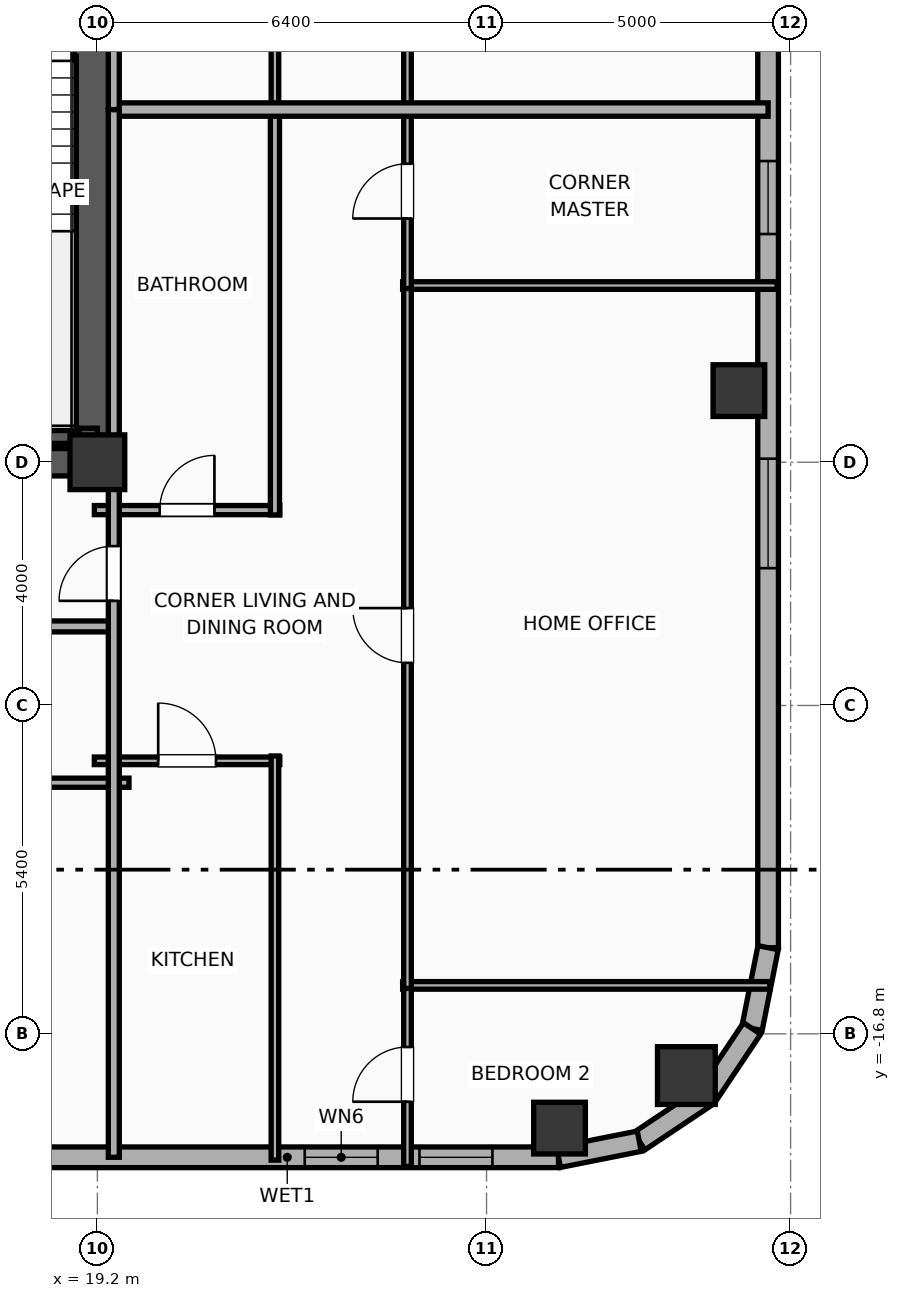
"""IFC4 building model, lengths in metres.
Left out: names, types, materials, properties, quantities, classifications, styles, units other than length and angle.
Written with IfcOpenShell. Run it as: python <this file> out.ifc"""

import sys

from ifc_helpers import new_model, si_unit, direction, frame, frame_2d, origin, origin_2d, place, context, subcontext, project, spatial, rectangle, hollow_rectangle, hollow_circle, extrude, element, fill, save


model = new_model("IFC4")
c1 = context("Model", 3, precision=1e-05, world=origin(), true_north=direction((0.0, 1.0)))
c2 = subcontext(c1, "Body", "Model", "MODEL_VIEW")
j1 = project(units=[si_unit("LENGTHUNIT", "METRE"), si_unit("PLANEANGLEUNIT", "RADIAN")], contexts=[c1])
p1 = place(None, origin())
s1 = spatial("IfcSite", under=j1, at=p1, CompositionType="ELEMENT")
p2 = place(p1, origin())
s2 = spatial("IfcBuilding", under=s1, at=p2, CompositionType="ELEMENT")
p3 = place(p2, frame((0.0, 0.0, 200.2)))
s3 = spatial("IfcBuildingStorey", under=s2, at=p3, CompositionType="ELEMENT", Elevation=200.2)
p4 = place(p3, frame((19.2, -7.4, 0.0), z_axis=(0.0, 0.0, 1.0), x_axis=(1.0, 0.0, 0.0)))
e1 = element("IfcColumn", 1, at=p4, inside=s3, PredefinedType="COLUMN", context=c2, shape_type="SweptSolid", body=[
    extrude(rectangle(XDim=0.9, YDim=0.9, at=origin_2d()), origin(), (0.0, 0.0, 1.0), 3.9),
])
p5 = place(p3, frame((12.175, -7.4, 0.0), z_axis=(0.0, 0.0, 1.0), x_axis=(1.0, 0.0, 0.0)))
e2 = element("IfcWall", 2, at=p5, inside=s3, PredefinedType="SHEAR", context=c2, shape_type="SweptSolid", body=[
    extrude(rectangle(XDim=7.25, YDim=0.45, at=frame_2d((3.625, 0.0))), origin(), (0.0, 0.0, 1.0), 3.65),
])
p6 = place(p3, frame((19.145, -7.4, 0.0), z_axis=(0.0, 0.0, 1.0), x_axis=(0.0, 1.0, 0.0)))
e3 = element("IfcWall", 3, at=p6, inside=s3, PredefinedType="SHEAR", context=c2, shape_type="SweptSolid", body=[
    extrude(rectangle(XDim=14.8, YDim=0.65, at=frame_2d((7.4, 0.0))), origin(), (0.0, 0.0, 1.0), 3.65),
])
p7 = place(p3, frame((15.74, -6.965, 0.0), z_axis=(0.0, 0.0, 1.0), x_axis=(1.0, 0.0, 0.0)))
e4 = element("IfcWall", 4, at=p7, inside=s3, PredefinedType="SOLIDWALL", context=c2, shape_type="SweptSolid", body=[
    extrude(rectangle(XDim=3.46, YDim=0.25, at=frame_2d((1.73, 0.0))), origin(), (0.0, 0.0, 1.0), 3.65),
])
p8 = place(p3, frame((26.8, -18.35, 0.0), z_axis=(0.0, 0.0, 1.0), x_axis=(1.0, 0.0, 0.0)))
e5 = element("IfcColumn", 5, at=p8, inside=s3, PredefinedType="COLUMN", context=c2, shape_type="SweptSolid", body=[
    extrude(hollow_rectangle(XDim=0.85, YDim=0.85, WallThickness=0.028, at=origin_2d()), origin(), (0.0, 0.0, 1.0), 3.9),
])
p9 = place(p3, frame((28.886, -17.486, 0.0), z_axis=(0.0, 0.0, 1.0), x_axis=(1.0, 0.0, 0.0)))
e6 = element("IfcColumn", 6, at=p9, inside=s3, PredefinedType="COLUMN", context=c2, shape_type="SweptSolid", body=[
    extrude(hollow_circle(Radius=0.475, WallThickness=0.032, at=origin_2d()), origin(), (0.0, 0.0, 1.0), 3.9),
])
p10 = place(p3, frame((29.75, -6.222, 0.0), z_axis=(0.0, 0.0, 1.0), x_axis=(1.0, 0.0, 0.0)))
e7 = element("IfcColumn", 7, at=p10, inside=s3, PredefinedType="COLUMN", context=c2, shape_type="SweptSolid", body=[
    extrude(hollow_rectangle(XDim=0.85, YDim=0.85, WallThickness=0.028, at=origin_2d()), origin(), (0.0, 0.0, 1.0), 3.9),
])
p11 = place(p3, frame((26.783, -18.83, 0.0), z_axis=(0.0, 0.0, 1.0), x_axis=(-1.0, 0.0, 0.0)))
e8 = element("IfcWall", 8, at=p11, inside=s3, PredefinedType="ELEMENTEDWALL", context=c2, shape_type="SweptSolid", body=[
    extrude(rectangle(XDim=8.922, YDim=0.34, at=frame_2d((4.461, 0.0))), origin(), (0.0, 0.0, 1.0), 2.54),
])
p12 = place(p11, frame((2.973, 0.0, 0.75)))
e9 = element("IfcOpeningElement", 9, at=p12, cuts=e8, PredefinedType="OPENING", context=c2, shape_type="SweptSolid", body=[
    extrude(rectangle(XDim=1.2, YDim=1.63, at=frame_2d((0.6, 0.815))), frame((0.0, 0.18, 0.0), z_axis=(0.0, -1.0, 0.0), x_axis=(1.0, 0.0, 0.0)), (0.0, 0.0, 1.0), 0.36),
])
p13 = place(p11, frame((1.087, 0.0, 0.75)))
e10 = element("IfcOpeningElement", 10, at=p13, cuts=e8, PredefinedType="OPENING", context=c2, shape_type="SweptSolid", body=[
    extrude(rectangle(XDim=1.2, YDim=1.63, at=frame_2d((0.6, 0.815))), frame((0.0, 0.18, 0.0), z_axis=(0.0, -1.0, 0.0), x_axis=(1.0, 0.0, 0.0)), (0.0, 0.0, 1.0), 0.36),
])
p14 = place(p3, frame((30.23, 16.583, 0.0), z_axis=(0.0, 0.0, 1.0), x_axis=(0.0, -1.0, 0.0)))
e11 = element("IfcWall", 11, at=p14, inside=s3, PredefinedType="ELEMENTEDWALL", context=c2, shape_type="SweptSolid", body=[
    extrude(rectangle(XDim=31.967, YDim=0.34, at=frame_2d((15.983, 0.0))), origin(), (0.0, 0.0, 1.0), 2.54),
])
p15 = place(p14, frame((6.242, 0.0, 0.75)))
e12 = element("IfcOpeningElement", 12, at=p15, cuts=e11, PredefinedType="OPENING", context=c2, shape_type="SweptSolid", body=[
    extrude(rectangle(XDim=1.8, YDim=1.63, at=frame_2d((0.9, 0.815))), frame((0.0, 0.18, 0.0), z_axis=(0.0, -1.0, 0.0), x_axis=(1.0, 0.0, 0.0)), (0.0, 0.0, 1.0), 0.36),
])
p16 = place(p14, frame((23.925, 0.0, 0.75)))
e13 = element("IfcOpeningElement", 13, at=p16, cuts=e11, PredefinedType="OPENING", context=c2, shape_type="SweptSolid", body=[
    extrude(rectangle(XDim=1.8, YDim=1.63, at=frame_2d((0.9, 0.815))), frame((0.0, 0.18, 0.0), z_axis=(0.0, -1.0, 0.0), x_axis=(1.0, 0.0, 0.0)), (0.0, 0.0, 1.0), 0.36),
])
p17 = place(p14, frame((19.03, 0.0, 0.75)))
e14 = element("IfcOpeningElement", 14, at=p17, cuts=e11, PredefinedType="OPENING", context=c2, shape_type="SweptSolid", body=[
    extrude(rectangle(XDim=1.2, YDim=1.63, at=frame_2d((0.6, 0.815))), frame((0.0, 0.18, 0.0), z_axis=(0.0, -1.0, 0.0), x_axis=(1.0, 0.0, 0.0)), (0.0, 0.0, 1.0), 0.36),
])
p18 = place(p14, frame((15.773, 0.0, 0.75)))
e15 = element("IfcOpeningElement", 15, at=p18, cuts=e11, PredefinedType="OPENING", context=c2, shape_type="SweptSolid", body=[
    extrude(rectangle(XDim=1.2, YDim=1.63, at=frame_2d((0.6, 0.815))), frame((0.0, 0.18, 0.0), z_axis=(0.0, -1.0, 0.0), x_axis=(1.0, 0.0, 0.0)), (0.0, 0.0, 1.0), 0.36),
])
p19 = place(p3, frame((30.23, -15.383, 0.0), z_axis=(0.0, 0.0, 1.0), x_axis=(-0.195110379894, -0.98078129043, 0.0)))
e16 = element("IfcWall", 16, at=p19, inside=s3, PredefinedType="ELEMENTEDWALL", context=c2, shape_type="SweptSolid", body=[
    extrude(rectangle(XDim=1.354, YDim=0.34, at=frame_2d((0.677, 0.0))), origin(), (0.0, 0.0, 1.0), 3.65),
])
p20 = place(p3, frame((29.966, -16.711, 0.0), z_axis=(0.0, 0.0, 1.0), x_axis=(-0.555584683399, -0.831459956686, 0.0)))
e17 = element("IfcWall", 17, at=p20, inside=s3, PredefinedType="ELEMENTEDWALL", context=c2, shape_type="SweptSolid", body=[
    extrude(rectangle(XDim=1.337, YDim=0.34, at=frame_2d((0.668, 0.0))), origin(), (0.0, 0.0, 1.0), 3.65),
])
p21 = place(p3, frame((29.223, -17.823, 0.0), z_axis=(0.0, 0.0, 1.0), x_axis=(-0.831403586725, -0.555669034571, 0.0)))
e18 = element("IfcWall", 18, at=p21, inside=s3, PredefinedType="ELEMENTEDWALL", context=c2, shape_type="SweptSolid", body=[
    extrude(rectangle(XDim=1.337, YDim=0.34, at=frame_2d((0.668, 0.0))), origin(), (0.0, 0.0, 1.0), 2.54),
])
p22 = place(p3, frame((28.111, -18.566, 0.0), z_axis=(0.0, 0.0, 1.0), x_axis=(-0.980788153188, -0.195075878998, 0.0)))
e19 = element("IfcWall", 19, at=p22, inside=s3, PredefinedType="ELEMENTEDWALL", context=c2, shape_type="SweptSolid", body=[
    extrude(rectangle(XDim=1.354, YDim=0.34, at=frame_2d((0.677, 0.0))), origin(), (0.0, 0.0, 1.0), 2.54),
])
p23 = place(p3, frame((17.436, -12.67, 0.0), z_axis=(0.0, 0.0, 1.0), x_axis=(1.0, 0.0, 0.0)))
e20 = element("IfcWall", 20, at=p23, inside=s3, PredefinedType="PLUMBINGWALL", context=c2, shape_type="SweptSolid", body=[
    extrude(rectangle(XDim=2.284, YDim=0.15, at=frame_2d((1.142, 0.0))), origin(), (0.0, 0.0, 1.0), 3.65),
])
p24 = place(p3, frame((8.08, -10.1, 0.0), z_axis=(0.0, 0.0, 1.0), x_axis=(1.0, 0.0, 0.0)))
e21 = element("IfcWall", 21, at=p24, inside=s3, PredefinedType="PARTITIONING", context=c2, shape_type="SweptSolid", body=[
    extrude(rectangle(XDim=11.42, YDim=0.18, at=frame_2d((5.71, 0.0))), origin(), (0.0, 0.0, 1.0), 3.65),
])
p25 = place(p24, frame((1.175, 0.0, 0.0)))
e22 = element("IfcOpeningElement", 22, at=p25, cuts=e21, PredefinedType="OPENING", context=c2, shape_type="SweptSolid", body=[
    extrude(rectangle(XDim=1.15, YDim=2.05, at=frame_2d((0.575, 1.025))), frame((0.0, 0.1, 0.0), z_axis=(0.0, -1.0, 0.0), x_axis=(1.0, 0.0, 0.0)), (0.0, 0.0, 1.0), 0.2),
])
p26 = place(p24, frame((8.243, 0.0, 0.0)))
e23 = element("IfcOpeningElement", 23, at=p26, cuts=e21, PredefinedType="OPENING", context=c2, shape_type="SweptSolid", body=[
    extrude(rectangle(XDim=0.9, YDim=2.05, at=frame_2d((0.45, 1.025))), frame((0.0, 0.1, 0.0), z_axis=(0.0, -1.0, 0.0), x_axis=(1.0, 0.0, 0.0)), (0.0, 0.0, 1.0), 0.2),
])
p27 = place(p3, frame((24.22, -16.003, 0.0), z_axis=(0.0, 0.0, 1.0), x_axis=(1.0, 0.0, 0.0)))
e24 = element("IfcWall", 24, at=p27, inside=s3, PredefinedType="PARTITIONING", context=c2, shape_type="SweptSolid", body=[
    extrude(rectangle(XDim=6.04, YDim=0.125, at=frame_2d((3.02, 0.0))), origin(), (0.0, 0.0, 1.0), 3.65),
])
p28 = place(p3, frame((24.22, -4.494, 0.0), z_axis=(0.0, 0.0, 1.0), x_axis=(1.0, 0.0, 0.0)))
e25 = element("IfcWall", 25, at=p28, inside=s3, PredefinedType="PARTITIONING", context=c2, shape_type="SweptSolid", body=[
    extrude(rectangle(XDim=6.16, YDim=0.125, at=frame_2d((3.08, 0.0))), origin(), (0.0, 0.0, 1.0), 3.65),
])
p29 = place(p3, frame((24.3, -18.98, 0.0), z_axis=(0.0, 0.0, 1.0), x_axis=(0.0, 1.0, 0.0)))
e26 = element("IfcWall", 26, at=p29, inside=s3, PredefinedType="PARTITIONING", context=c2, shape_type="SweptSolid", body=[
    extrude(rectangle(XDim=3.027, YDim=0.125, at=frame_2d((1.514, 0.0))), origin(), (0.0, 0.0, 1.0), 3.65),
])
p30 = place(p29, frame((1.063, 0.0, 0.0)))
e27 = element("IfcOpeningElement", 27, at=p30, cuts=e26, PredefinedType="OPENING", context=c2, shape_type="SweptSolid", body=[
    extrude(rectangle(XDim=0.9, YDim=2.05, at=frame_2d((0.45, 1.025))), frame((0.0, 0.073, 0.0), z_axis=(0.0, -1.0, 0.0), x_axis=(1.0, 0.0, 0.0)), (0.0, 0.0, 1.0), 0.145),
])
p31 = place(p3, frame((24.3, -16.053, 0.0), z_axis=(0.0, 0.0, 1.0), x_axis=(0.0, 1.0, 0.0)))
e28 = element("IfcWall", 28, at=p31, inside=s3, PredefinedType="PARTITIONING", context=c2, shape_type="SweptSolid", body=[
    extrude(rectangle(XDim=11.609, YDim=0.125, at=frame_2d((5.804, 0.0))), origin(), (0.0, 0.0, 1.0), 3.65),
])
p32 = place(p31, frame((5.354, 0.0, 0.0)))
e29 = element("IfcOpeningElement", 29, at=p32, cuts=e28, PredefinedType="OPENING", context=c2, shape_type="SweptSolid", body=[
    extrude(rectangle(XDim=0.9, YDim=2.05, at=frame_2d((0.45, 1.025))), frame((0.0, 0.073, 0.0), z_axis=(0.0, -1.0, 0.0), x_axis=(1.0, 0.0, 0.0)), (0.0, 0.0, 1.0), 0.145),
])
p33 = place(p3, frame((24.3, -4.544, 0.0), z_axis=(0.0, 0.0, 1.0), x_axis=(0.0, 1.0, 0.0)))
e30 = element("IfcWall", 30, at=p33, inside=s3, PredefinedType="PARTITIONING", context=c2, shape_type="SweptSolid", body=[
    extrude(rectangle(XDim=3.006, YDim=0.125, at=frame_2d((1.503, 0.0))), origin(), (0.0, 0.0, 1.0), 3.65),
])
p34 = place(p33, frame((1.152, 0.0, 0.0)))
e31 = element("IfcOpeningElement", 31, at=p34, cuts=e30, PredefinedType="OPENING", context=c2, shape_type="SweptSolid", body=[
    extrude(rectangle(XDim=0.9, YDim=2.05, at=frame_2d((0.45, 1.025))), frame((0.0, 0.073, 0.0), z_axis=(0.0, -1.0, 0.0), x_axis=(1.0, 0.0, 0.0)), (0.0, 0.0, 1.0), 0.145),
])
p35 = place(p3, frame((19.15, -12.31, 0.0), z_axis=(0.0, 0.0, 1.0), x_axis=(1.0, 0.0, 0.0)))
e32 = element("IfcWall", 32, at=p35, inside=s3, PredefinedType="PARTITIONING", context=c2, shape_type="SweptSolid", body=[
    extrude(rectangle(XDim=3.05, YDim=0.125, at=frame_2d((1.525, 0.0))), origin(), (0.0, 0.0, 1.0), 3.65),
])
p36 = place(p35, frame((1.05, 0.0, 0.0)))
e33 = element("IfcOpeningElement", 33, at=p36, cuts=e32, PredefinedType="OPENING", context=c2, shape_type="SweptSolid", body=[
    extrude(rectangle(XDim=0.95, YDim=2.05, at=frame_2d((0.475, 1.025))), frame((0.0, 0.073, 0.0), z_axis=(0.0, -1.0, 0.0), x_axis=(1.0, 0.0, 0.0)), (0.0, 0.0, 1.0), 0.145),
])
p37 = place(p3, frame((19.15, -8.187, 0.0), z_axis=(0.0, 0.0, 1.0), x_axis=(1.0, 0.0, 0.0)))
e34 = element("IfcWall", 34, at=p37, inside=s3, PredefinedType="PLUMBINGWALL", context=c2, shape_type="SweptSolid", body=[
    extrude(rectangle(XDim=3.05, YDim=0.15, at=frame_2d((1.525, 0.0))), origin(), (0.0, 0.0, 1.0), 3.65),
])
p38 = place(p37, frame((1.075, 0.0, 0.0)))
e35 = element("IfcOpeningElement", 35, at=p38, cuts=e34, PredefinedType="OPENING", context=c2, shape_type="SweptSolid", body=[
    extrude(rectangle(XDim=0.9, YDim=2.05, at=frame_2d((0.45, 1.025))), frame((0.0, 0.085, 0.0), z_axis=(0.0, -1.0, 0.0), x_axis=(1.0, 0.0, 0.0)), (0.0, 0.0, 1.0), 0.17),
])
p39 = place(p3, frame((22.12, -18.877, 0.0), z_axis=(0.0, 0.0, 1.0), x_axis=(0.0, 1.0, 0.0)))
e36 = element("IfcWall", 36, at=p39, inside=s3, PredefinedType="PARTITIONING", context=c2, shape_type="SweptSolid", body=[
    extrude(rectangle(XDim=6.647, YDim=0.125, at=frame_2d((3.323, 0.0))), origin(), (0.0, 0.0, 1.0), 3.65),
])
p40 = place(p3, frame((22.12, -8.267, 0.0), z_axis=(0.0, 0.0, 1.0), x_axis=(0.0, 1.0, 0.0)))
e37 = element("IfcWall", 37, at=p40, inside=s3, PredefinedType="PLUMBINGWALL", context=c2, shape_type="SweptSolid", body=[
    extrude(rectangle(XDim=6.647, YDim=0.15, at=frame_2d((3.323, 0.0))), origin(), (0.0, 0.0, 1.0), 3.65),
])
p41 = place(p3, frame((24.3, -1.663, 0.0), z_axis=(0.0, 0.0, 1.0), x_axis=(0.0, 1.0, 0.0)))
e38 = element("IfcWall", 38, at=p41, inside=s3, PredefinedType="PARTITIONING", context=c2, shape_type="SweptSolid", body=[
    extrude(rectangle(XDim=3.733, YDim=0.125, at=frame_2d((1.866, 0.0))), origin(), (0.0, 0.0, 1.0), 3.65),
])
p42 = place(p41, frame((1.317, 0.0, 0.0)))
e39 = element("IfcOpeningElement", 39, at=p42, cuts=e38, PredefinedType="OPENING", context=c2, shape_type="SweptSolid", body=[
    extrude(rectangle(XDim=0.9, YDim=2.05, at=frame_2d((0.45, 1.025))), frame((0.0, 0.073, 0.0), z_axis=(0.0, -1.0, 0.0), x_axis=(1.0, 0.0, 0.0)), (0.0, 0.0, 1.0), 0.145),
])
p43 = place(p3, frame((22.12, -1.58, 0.0), z_axis=(0.0, 0.0, 1.0), x_axis=(0.0, 1.0, 0.0)))
e40 = element("IfcWall", 40, at=p43, inside=s3, PredefinedType="PARTITIONING", context=c2, shape_type="SweptSolid", body=[
    extrude(rectangle(XDim=6.72, YDim=0.125, at=frame_2d((3.36, 0.0))), origin(), (0.0, 0.0, 1.0), 3.65),
])
p44 = place(p3, frame((19.47, -1.6, 0.0), z_axis=(0.0, 0.0, 1.0), x_axis=(1.0, 0.0, 0.0)))
e41 = element("IfcWall", 41, at=p44, inside=s3, PredefinedType="PARTITIONING", context=c2, shape_type="SweptSolid", body=[
    extrude(rectangle(XDim=10.76, YDim=0.22, at=frame_2d((5.38, 0.0))), origin(), (0.0, 0.0, 1.0), 3.65),
])
p45 = place(p3, frame((19.47, -18.83, 0.0), z_axis=(0.0, 0.0, 1.0), x_axis=(0.0, 1.0, 0.0)))
e42 = element("IfcWall", 42, at=p45, inside=s3, PredefinedType="PARTITIONING", context=c2, shape_type="SweptSolid", body=[
    extrude(rectangle(XDim=17.23, YDim=0.18, at=frame_2d((8.615, 0.0))), origin(), (0.0, 0.0, 1.0), 3.65),
])
p46 = place(p45, frame((9.151, 0.0, 0.0)))
e43 = element("IfcOpeningElement", 43, at=p46, cuts=e42, PredefinedType="OPENING", context=c2, shape_type="SweptSolid", body=[
    extrude(rectangle(XDim=0.9, YDim=2.05, at=frame_2d((0.45, 1.025))), frame((0.0, 0.1, 0.0), z_axis=(0.0, -1.0, 0.0), x_axis=(1.0, 0.0, 0.0)), (0.0, 0.0, 1.0), 0.2),
])
p47 = place(p3, frame((19.47, -1.6, 0.0), z_axis=(0.0, 0.0, 1.0), x_axis=(0.0, 1.0, 0.0)))
e44 = element("IfcWall", 44, at=p47, inside=s3, PredefinedType="PARTITIONING", context=c2, shape_type="SweptSolid", body=[
    extrude(rectangle(XDim=21.63, YDim=0.18, at=frame_2d((10.815, 0.0))), origin(), (0.0, 0.0, 1.0), 3.65),
])
p48 = place(p47, frame((10.38, 0.0, 0.0)))
e45 = element("IfcOpeningElement", 45, at=p48, cuts=e44, PredefinedType="OPENING", context=c2, shape_type="SweptSolid", body=[
    extrude(rectangle(XDim=0.9, YDim=2.05, at=frame_2d((0.45, 1.025))), frame((0.0, 0.1, 0.0), z_axis=(0.0, -1.0, 0.0), x_axis=(1.0, 0.0, 0.0)), (0.0, 0.0, 1.0), 0.2),
])
p49 = place(p16, origin())
e46 = element("IfcWindow", 46, at=p49, inside=s3, PartitioningType="SINGLE_PANEL", PredefinedType="WINDOW", context=c2, shape_type="SweptSolid", body=[
    extrude(rectangle(XDim=1.8, YDim=1.63, at=frame_2d((0.9, 0.815))), frame((0.0, 0.03, 0.0), z_axis=(0.0, -1.0, 0.0), x_axis=(1.0, 0.0, 0.0)), (0.0, 0.0, 1.0), 0.06),
])
fill(e13, e46)
p50 = place(p12, origin())
e47 = element("IfcWindow", 47, at=p50, inside=s3, PartitioningType="SINGLE_PANEL", PredefinedType="WINDOW", context=c2, shape_type="SweptSolid", body=[
    extrude(rectangle(XDim=1.2, YDim=1.63, at=frame_2d((0.6, 0.815))), frame((0.0, 0.03, 0.0), z_axis=(0.0, -1.0, 0.0), x_axis=(1.0, 0.0, 0.0)), (0.0, 0.0, 1.0), 0.06),
])
fill(e9, e47)
p51 = place(p17, origin())
e48 = element("IfcWindow", 48, at=p51, inside=s3, PartitioningType="SINGLE_PANEL", PredefinedType="WINDOW", context=c2, shape_type="SweptSolid", body=[
    extrude(rectangle(XDim=1.2, YDim=1.63, at=frame_2d((0.6, 0.815))), frame((0.0, 0.03, 0.0), z_axis=(0.0, -1.0, 0.0), x_axis=(1.0, 0.0, 0.0)), (0.0, 0.0, 1.0), 0.06),
])
fill(e14, e48)
p52 = place(p13, origin())
e49 = element("IfcWindow", 49, at=p52, inside=s3, PartitioningType="SINGLE_PANEL", PredefinedType="WINDOW", context=c2, shape_type="SweptSolid", body=[
    extrude(rectangle(XDim=1.2, YDim=1.63, at=frame_2d((0.6, 0.815))), frame((0.0, 0.03, 0.0), z_axis=(0.0, -1.0, 0.0), x_axis=(1.0, 0.0, 0.0)), (0.0, 0.0, 1.0), 0.06),
])
fill(e10, e49)
p53 = place(p30, origin())
e50 = element("IfcDoor", 50, at=p53, inside=s3, OperationType="SINGLE_SWING_LEFT", PredefinedType="DOOR", context=c2, shape_type="SweptSolid", body=[
    extrude(rectangle(XDim=0.9, YDim=2.05, at=frame_2d((0.45, 1.025))), frame((0.0, 0.025, 0.0), z_axis=(0.0, -1.0, 0.0), x_axis=(1.0, 0.0, 0.0)), (0.0, 0.0, 1.0), 0.05),
])
fill(e27, e50)
p54 = place(p32, origin())
e51 = element("IfcDoor", 51, at=p54, inside=s3, OperationType="SINGLE_SWING_RIGHT", PredefinedType="DOOR", context=c2, shape_type="SweptSolid", body=[
    extrude(rectangle(XDim=0.9, YDim=2.05, at=frame_2d((0.45, 1.025))), frame((0.0, 0.025, 0.0), z_axis=(0.0, -1.0, 0.0), x_axis=(1.0, 0.0, 0.0)), (0.0, 0.0, 1.0), 0.05),
])
fill(e29, e51)
p55 = place(p34, origin())
e52 = element("IfcDoor", 52, at=p55, inside=s3, OperationType="SINGLE_SWING_LEFT", PredefinedType="DOOR", context=c2, shape_type="SweptSolid", body=[
    extrude(rectangle(XDim=0.9, YDim=2.05, at=frame_2d((0.45, 1.025))), frame((0.0, 0.025, 0.0), z_axis=(0.0, -1.0, 0.0), x_axis=(1.0, 0.0, 0.0)), (0.0, 0.0, 1.0), 0.05),
])
fill(e31, e52)
p56 = place(p36, origin())
e53 = element("IfcDoor", 53, at=p56, inside=s3, OperationType="SINGLE_SWING_LEFT", PredefinedType="DOOR", context=c2, shape_type="SweptSolid", body=[
    extrude(rectangle(XDim=0.95, YDim=2.05, at=frame_2d((0.475, 1.025))), frame((0.0, 0.025, 0.0), z_axis=(0.0, -1.0, 0.0), x_axis=(1.0, 0.0, 0.0)), (0.0, 0.0, 1.0), 0.05),
])
fill(e33, e53)
p57 = place(p38, origin())
e54 = element("IfcDoor", 54, at=p57, inside=s3, OperationType="SINGLE_SWING_RIGHT", PredefinedType="DOOR", context=c2, shape_type="SweptSolid", body=[
    extrude(rectangle(XDim=0.9, YDim=2.05, at=frame_2d((0.45, 1.025))), frame((0.0, 0.025, 0.0), z_axis=(0.0, -1.0, 0.0), x_axis=(1.0, 0.0, 0.0)), (0.0, 0.0, 1.0), 0.05),
])
fill(e35, e54)
p58 = place(p46, origin())
e55 = element("IfcDoor", 55, at=p58, inside=s3, OperationType="SINGLE_SWING_LEFT", PredefinedType="DOOR", context=c2, shape_type="SweptSolid", body=[
    extrude(rectangle(XDim=0.9, YDim=2.05, at=frame_2d((0.45, 1.025))), frame((0.0, 0.025, 0.0), z_axis=(0.0, -1.0, 0.0), x_axis=(1.0, 0.0, 0.0)), (0.0, 0.0, 1.0), 0.05),
])
fill(e43, e55)
save(model, sys.argv[1])
